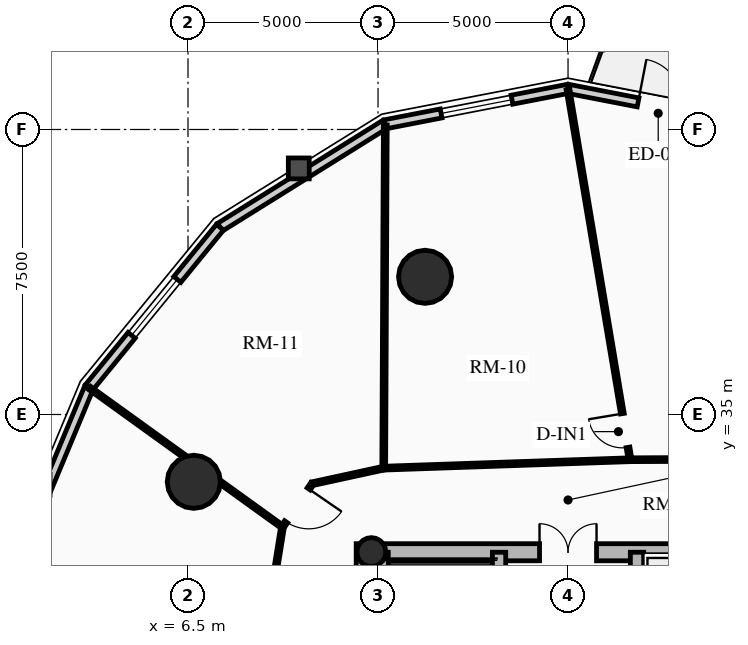
"""IFC4 building model, lengths in metres.
Left out: names, types, materials, properties, quantities, classifications, styles, units other than length and angle.
Written with IfcOpenShell. Run it as: python <this file> out.ifc"""

import sys

from ifc_helpers import new_model, si_unit, direction, frame, frame_2d, origin, origin_2d, place, context, subcontext, project, spatial, rectangle, circle, hollow_circle, extrude, source, transform, mapped, element, fill, save


model = new_model("IFC4")
c1 = context("Model", 3, precision=1e-05, world=origin(), true_north=direction((0.0, 1.0)))
c2 = subcontext(c1, "Body", "Model", "MODEL_VIEW")
j1 = project(units=[si_unit("LENGTHUNIT", "METRE"), si_unit("PLANEANGLEUNIT", "RADIAN")], contexts=[c1])
p1 = place(None, origin())
s1 = spatial("IfcSite", under=j1, at=p1, CompositionType="ELEMENT")
p2 = place(p1, origin())
s2 = spatial("IfcBuilding", under=s1, at=p2, CompositionType="ELEMENT")
p3 = place(p2, frame((0.0, 0.0, 96.34)))
s3 = spatial("IfcBuildingStorey", under=s2, at=p3, CompositionType="ELEMENT", Elevation=96.34)
p4 = place(p3, frame((11.15, 17.4, 0.0), z_axis=(0.0, 0.0, 1.0), x_axis=(0.0, 1.0, 0.0)))
e1 = element("IfcWall", 1, at=p4, inside=s3, PredefinedType="SHEAR", context=c2, shape_type="SweptSolid", body=[
    extrude(rectangle(XDim=14.2, YDim=0.45, at=frame_2d((7.1, 0.0))), origin(), (0.0, 0.0, 1.0), 2.91),
])
p5 = place(p3, frame((11.15, 31.375, 0.0), z_axis=(0.0, 0.0, 1.0), x_axis=(1.0, 0.0, 0.0)))
e2 = element("IfcWall", 2, at=p5, inside=s3, PredefinedType="SHEAR", context=c2, shape_type="SweptSolid", body=[
    extrude(rectangle(XDim=10.7, YDim=0.45, at=frame_2d((5.35, 0.0))), origin(), (0.0, 0.0, 1.0), 2.91),
])
m1 = source(origin(), c2, "Body", "SweptSolid", [
    extrude(rectangle(XDim=1.5, YDim=2.02, at=frame_2d((0.75, 1.01))), frame((0.0, 0.235, 0.0), z_axis=(0.0, -1.0, 0.0), x_axis=(1.0, 0.0, 0.0)), (0.0, 0.0, 1.0), 0.47),
])
p6 = place(p5, frame((4.6, 0.0, 0.0)))
e3 = element("IfcOpeningElement", 3, at=p6, cuts=e2, PredefinedType="OPENING", context=c2, shape_type="MappedRepresentation", body=[
    mapped(m1, transform((0.0, 0.0, 0.0), x_axis=(1.0, 0.0, 0.0), y_axis=(0.0, 1.0, 0.0), z_axis=(0.0, 0.0, 1.0), scale=1.0)),
])
p7 = place(p3, frame((14.685, 17.625, 0.0), z_axis=(0.0, 0.0, 1.0), x_axis=(0.0, 1.0, 0.0)))
e4 = element("IfcWall", 4, at=p7, inside=s3, PredefinedType="SHEAR", context=c2, shape_type="SweptSolid", body=[
    extrude(rectangle(XDim=13.75, YDim=0.35, at=frame_2d((6.875, 0.0))), origin(), (0.0, 0.0, 1.0), 2.91),
])
m2 = source(origin(), c2, "Body", "SweptSolid", [
    extrude(rectangle(XDim=1.1, YDim=2.015, at=frame_2d((0.55, 1.007))), frame((0.0, 0.185, 0.0), z_axis=(0.0, -1.0, 0.0), x_axis=(1.0, 0.0, 0.0)), (0.0, 0.0, 1.0), 0.37),
])
p8 = place(p7, frame((4.875, 0.0, 0.0)))
e5 = element("IfcOpeningElement", 5, at=p8, cuts=e4, PredefinedType="OPENING", context=c2, shape_type="MappedRepresentation", body=[
    mapped(m2, transform((0.0, 0.0, 0.0), x_axis=(1.0, 0.0, 0.0), y_axis=(0.0, 1.0, 0.0), z_axis=(0.0, 0.0, 1.0), scale=1.0)),
])
m3 = source(origin(), c2, "Body", "SweptSolid", [
    extrude(rectangle(XDim=1.15, YDim=2.02, at=frame_2d((0.575, 1.01))), frame((0.0, 0.185, 0.0), z_axis=(0.0, -1.0, 0.0), x_axis=(1.0, 0.0, 0.0)), (0.0, 0.0, 1.0), 0.37),
])
p9 = place(p7, frame((7.295, 0.0, 0.0)))
e6 = element("IfcOpeningElement", 6, at=p9, cuts=e4, PredefinedType="OPENING", context=c2, shape_type="MappedRepresentation", body=[
    mapped(m3, transform((0.0, 0.0, 0.0), x_axis=(1.0, 0.0, 0.0), y_axis=(0.0, 1.0, 0.0), z_axis=(0.0, 0.0, 1.0), scale=1.0)),
])
p10 = place(p3, frame((18.315, 17.625, 0.0), z_axis=(0.0, 0.0, 1.0), x_axis=(0.0, 1.0, 0.0)))
e7 = element("IfcWall", 7, at=p10, inside=s3, PredefinedType="SHEAR", context=c2, shape_type="SweptSolid", body=[
    extrude(rectangle(XDim=13.75, YDim=0.35, at=frame_2d((6.875, 0.0))), origin(), (0.0, 0.0, 1.0), 2.91),
])
p11 = place(p10, frame((10.0, 0.0, 0.0)))
e8 = element("IfcOpeningElement", 8, at=p11, cuts=e7, PredefinedType="OPENING", context=c2, shape_type="MappedRepresentation", body=[
    mapped(m2, transform((0.0, 0.0, 0.0), x_axis=(1.0, 0.0, 0.0), y_axis=(0.0, 1.0, 0.0), z_axis=(0.0, 0.0, 1.0), scale=1.0)),
])
p12 = place(p10, frame((12.0, 0.0, 0.0)))
e9 = element("IfcOpeningElement", 9, at=p12, cuts=e7, PredefinedType="OPENING", context=c2, shape_type="MappedRepresentation", body=[
    mapped(m2, transform((0.0, 0.0, 0.0), x_axis=(1.0, 0.0, 0.0), y_axis=(0.0, 1.0, 0.0), z_axis=(0.0, 0.0, 1.0), scale=1.0)),
])
p13 = place(p10, frame((5.305, 0.0, 0.0)))
e10 = element("IfcOpeningElement", 10, at=p13, cuts=e7, PredefinedType="OPENING", context=c2, shape_type="MappedRepresentation", body=[
    mapped(m3, transform((0.0, 0.0, 0.0), x_axis=(1.0, 0.0, 0.0), y_axis=(0.0, 1.0, 0.0), z_axis=(0.0, 0.0, 1.0), scale=1.0)),
])
p14 = place(p3, frame((11.595, 24.655, 0.0), z_axis=(0.0, 0.0, 1.0), x_axis=(0.0, 1.0, 0.0)))
e11 = element("IfcWall", 11, at=p14, inside=s3, PredefinedType="SHEAR", context=c2, shape_type="SweptSolid", body=[
    extrude(rectangle(XDim=6.72, YDim=0.35, at=frame_2d((3.36, 0.0))), origin(), (0.0, 0.0, 1.0), 2.91),
])
p15 = place(p3, frame((11.325, 31.38, 0.0), z_axis=(0.0, 0.0, 1.0), x_axis=(1.0, 0.0, 0.0)))
e12 = element("IfcColumn", 12, at=p15, inside=s3, PredefinedType="COLUMN", context=c2, shape_type="SweptSolid", body=[
    extrude(hollow_circle(Radius=0.38, WallThickness=0.032, at=origin_2d()), origin(), (0.0, 0.0, 1.0), 2.91),
])
for number, where, z_axis, x_axis in (
    (13, (12.739, 38.623, 0.0), (0.0, 0.0, 1.0), (1.0, 0.0, 0.0)),
    (14, (6.653, 33.229, 0.0), (0.0, 0.0, 1.0), (1.0, 0.0, 0.0)),
):
    element("IfcColumn", number, at=place(p3, frame(where, z_axis=z_axis, x_axis=x_axis)), inside=s3, PredefinedType="USERDEFINED", context=c2, shape_type="SweptSolid", body=[
        extrude(circle(Radius=0.7, at=origin_2d()), origin(), (0.0, 0.0, 1.0), 2.91),
    ])
p16 = place(p3, frame((16.5, 43.57, 0.0), z_axis=(0.0, 0.0, 1.0), x_axis=(0.981723785992, -0.190311344954, 0.0)))
e15 = element("IfcWall", 15, at=p16, inside=s3, PredefinedType="SOLIDWALL", context=c2, shape_type="SweptSolid", body=[
    extrude(rectangle(XDim=4.904, YDim=0.24, at=frame_2d((2.452, 0.0))), origin(), (0.0, 0.0, 1.0), 2.179),
])
m4 = source(origin(), c2, "Body", "SweptSolid", [
    extrude(rectangle(XDim=1.15, YDim=2.005, at=frame_2d((0.575, 1.002))), frame((0.0, 0.13, 0.0), z_axis=(0.0, -1.0, 0.0), x_axis=(1.0, 0.0, 0.0)), (0.0, 0.0, 1.0), 0.26),
])
p17 = place(p16, frame((1.877, 0.0, 0.0)))
e16 = element("IfcOpeningElement", 16, at=p17, cuts=e15, PredefinedType="OPENING", context=c2, shape_type="MappedRepresentation", body=[
    mapped(m4, transform((0.0, 0.0, 0.0), x_axis=(1.0, 0.0, 0.0), y_axis=(0.0, 1.0, 0.0), z_axis=(0.0, 0.0, 1.0), scale=1.0)),
])
p18 = place(p3, frame((11.685, 42.637, 0.0), z_axis=(0.0, 0.0, 1.0), x_axis=(0.981723785992, 0.190311344954, 0.0)))
e17 = element("IfcWall", 17, at=p18, inside=s3, PredefinedType="SOLIDWALL", context=c2, shape_type="SweptSolid", body=[
    extrude(rectangle(XDim=4.904, YDim=0.24, at=frame_2d((2.452, 0.0))), origin(), (0.0, 0.0, 1.0), 2.179),
])
m5 = source(origin(), c2, "Body", "SweptSolid", [
    extrude(rectangle(XDim=1.9, YDim=1.35, at=frame_2d((0.95, 0.675))), frame((0.0, 0.13, 0.0), z_axis=(0.0, -1.0, 0.0), x_axis=(1.0, 0.0, 0.0)), (0.0, 0.0, 1.0), 0.26),
])
p19 = place(p18, frame((1.502, 0.0, 0.65)))
e18 = element("IfcOpeningElement", 18, at=p19, cuts=e17, PredefinedType="OPENING", context=c2, shape_type="MappedRepresentation", body=[
    mapped(m5, transform((0.0, 0.0, 0.0), x_axis=(1.0, 0.0, 0.0), y_axis=(0.0, 1.0, 0.0), z_axis=(0.0, 0.0, 1.0), scale=1.0)),
])
p20 = place(p3, frame((7.342, 39.928, 0.0), z_axis=(0.0, 0.0, 1.0), x_axis=(0.848520380187, 0.529162701263, 0.0)))
e19 = element("IfcWall", 19, at=p20, inside=s3, PredefinedType="SOLIDWALL", context=c2, shape_type="SweptSolid", body=[
    extrude(rectangle(XDim=5.119, YDim=0.24, at=frame_2d((2.56, 0.0))), origin(), (0.0, 0.0, 1.0), 2.179),
])
p21 = place(p3, frame((3.895, 35.709, 0.0), z_axis=(0.0, 0.0, 1.0), x_axis=(0.632700781152, 0.77439635945, 0.0)))
e20 = element("IfcWall", 20, at=p21, inside=s3, PredefinedType="SOLIDWALL", context=c2, shape_type="SweptSolid", body=[
    extrude(rectangle(XDim=5.448, YDim=0.24, at=frame_2d((2.724, 0.0))), origin(), (0.0, 0.0, 1.0), 2.179),
])
p22 = place(p21, frame((1.774, 0.0, 0.65)))
e21 = element("IfcOpeningElement", 21, at=p22, cuts=e20, PredefinedType="OPENING", context=c2, shape_type="MappedRepresentation", body=[
    mapped(m5, transform((0.0, 0.0, 0.0), x_axis=(1.0, 0.0, 0.0), y_axis=(0.0, 1.0, 0.0), z_axis=(0.0, 0.0, 1.0), scale=1.0)),
])
p23 = place(p3, frame((1.682, 30.393, 0.0), z_axis=(0.0, 0.0, 1.0), x_axis=(0.384344417632, 0.923189779317, 0.0)))
e22 = element("IfcWall", 22, at=p23, inside=s3, PredefinedType="SOLIDWALL", context=c2, shape_type="SweptSolid", body=[
    extrude(rectangle(XDim=5.758, YDim=0.24, at=frame_2d((2.879, 0.0))), origin(), (0.0, 0.0, 1.0), 2.179),
])
p24 = place(p3, frame((21.496, 33.824, 0.0), z_axis=(0.0, 0.0, 1.0), x_axis=(-0.999990516754, -0.004355043261, 0.0)))
e23 = element("IfcWall", 23, at=p24, inside=s3, PredefinedType="MOVABLE", context=c2, shape_type="SweptSolid", body=[
    extrude(rectangle(XDim=3.364, YDim=0.1, at=frame_2d((1.682, 0.0))), origin(), (0.0, 0.0, 1.0), 2.225),
])
p25 = place(p3, frame((18.133, 33.81, 0.0), z_axis=(0.0, 0.0, 1.0), x_axis=(-0.999415793323, -0.03417706916, 0.0)))
e24 = element("IfcWall", 24, at=p25, inside=s3, PredefinedType="MOVABLE", context=c2, shape_type="SweptSolid", body=[
    extrude(rectangle(XDim=6.486, YDim=0.1, at=frame_2d((3.243, 0.0))), origin(), (0.0, 0.0, 1.0), 2.225),
])
p26 = place(p3, frame((11.65, 33.588, 0.0), z_axis=(0.0, 0.0, 1.0), x_axis=(-0.977141987047, -0.212587716366, 0.0)))
e25 = element("IfcWall", 25, at=p26, inside=s3, PredefinedType="MOVABLE", context=c2, shape_type="SweptSolid", body=[
    extrude(rectangle(XDim=1.924, YDim=0.1, at=frame_2d((0.962, 0.0))), origin(), (0.0, 0.0, 1.0), 2.225),
])
p27 = place(p3, frame((9.771, 33.179, 0.0), z_axis=(0.0, 0.0, 1.0), x_axis=(-0.56664857412, -0.823959582412, 0.0)))
e26 = element("IfcWall", 26, at=p27, inside=s3, PredefinedType="MOVABLE", context=c2, shape_type="SweptSolid", body=[
    extrude(rectangle(XDim=1.384, YDim=0.1, at=frame_2d((0.692, 0.0))), origin(), (0.0, 0.0, 1.0), 2.225),
])
m6 = source(origin(), c2, "Body", "SweptSolid", [
    extrude(rectangle(XDim=1.05, YDim=2.015, at=frame_2d((0.525, 1.007))), frame((0.0, 0.06, 0.0), z_axis=(0.0, -1.0, 0.0), x_axis=(1.0, 0.0, 0.0)), (0.0, 0.0, 1.0), 0.12),
])
p28 = place(p27, frame((0.167, 0.0, 0.0)))
e27 = element("IfcOpeningElement", 27, at=p28, cuts=e26, PredefinedType="OPENING", context=c2, shape_type="MappedRepresentation", body=[
    mapped(m6, transform((0.0, 0.0, 0.0), x_axis=(1.0, 0.0, 0.0), y_axis=(0.0, 1.0, 0.0), z_axis=(0.0, 0.0, 1.0), scale=1.0)),
])
p29 = place(p3, frame((8.986, 32.038, 0.0), z_axis=(0.0, 0.0, 1.0), x_axis=(-0.158224526738, -0.987403159372, 0.0)))
e28 = element("IfcWall", 28, at=p29, inside=s3, PredefinedType="MOVABLE", context=c2, shape_type="SweptSolid", body=[
    extrude(rectangle(XDim=1.546, YDim=0.1, at=frame_2d((0.773, 0.0))), origin(), (0.0, 0.0, 1.0), 2.225),
])
p30 = place(p3, frame((11.65, 33.588, 0.0), z_axis=(0.0, 0.0, 1.0), x_axis=(0.004542212376, 0.9999896841, 0.0)))
e29 = element("IfcWall", 29, at=p30, inside=s3, PredefinedType="MOVABLE", context=c2, shape_type="SweptSolid", body=[
    extrude(rectangle(XDim=9.03, YDim=0.1, at=frame_2d((4.515, 0.0))), origin(), (0.0, 0.0, 1.0), 2.179),
])
p31 = place(p3, frame((8.986, 32.038, 0.0), z_axis=(0.0, 0.0, 1.0), x_axis=(-0.811184127106, 0.584790827502, 0.0)))
e30 = element("IfcWall", 30, at=p31, inside=s3, PredefinedType="MOVABLE", context=c2, shape_type="SweptSolid", body=[
    extrude(rectangle(XDim=6.257, YDim=0.1, at=frame_2d((3.128, 0.0))), origin(), (0.0, 0.0, 1.0), 2.179),
])
p32 = place(p3, frame((18.133, 33.81, 0.0), z_axis=(0.0, 0.0, 1.0), x_axis=(-0.165324898919, 0.98623915852, 0.0)))
e31 = element("IfcWall", 31, at=p32, inside=s3, PredefinedType="MOVABLE", context=c2, shape_type="SweptSolid", body=[
    extrude(rectangle(XDim=9.876, YDim=0.1, at=frame_2d((4.938, 0.0))), origin(), (0.0, 0.0, 1.0), 2.179),
])
m7 = source(origin(), c2, "Body", "SweptSolid", [
    extrude(rectangle(XDim=0.9, YDim=2.005, at=frame_2d((0.45, 1.002))), frame((0.0, 0.06, 0.0), z_axis=(0.0, -1.0, 0.0), x_axis=(1.0, 0.0, 0.0)), (0.0, 0.0, 1.0), 0.12),
])
p33 = place(p32, frame((0.33, 0.0, 0.0)))
e32 = element("IfcOpeningElement", 32, at=p33, cuts=e31, PredefinedType="OPENING", context=c2, shape_type="MappedRepresentation", body=[
    mapped(m7, transform((0.0, 0.0, 0.0), x_axis=(1.0, 0.0, 0.0), y_axis=(0.0, 1.0, 0.0), z_axis=(0.0, 0.0, 1.0), scale=1.0)),
])
m8 = source(origin(), c2, "Body", "SweptSolid", [
    extrude(rectangle(XDim=1.15, YDim=2.005, at=frame_2d((0.575, 1.002))), frame((0.0, 0.025, 0.0), z_axis=(0.0, -1.0, 0.0), x_axis=(1.0, 0.0, 0.0)), (0.0, 0.0, 1.0), 0.05),
])
p34 = place(p17, origin())
e33 = element("IfcDoor", 33, at=p34, inside=s3, OperationType="SINGLE_SWING_LEFT", PredefinedType="DOOR", context=c2, shape_type="MappedRepresentation", body=[
    mapped(m8, transform((0.0, 0.0, 0.0), x_axis=(1.0, 0.0, 0.0), y_axis=(0.0, 1.0, 0.0), z_axis=(0.0, 0.0, 1.0), scale=1.0)),
])
fill(e16, e33)
m9 = source(origin(), c2, "Body", "SweptSolid", [
    extrude(rectangle(XDim=1.9, YDim=1.35, at=frame_2d((0.95, 0.675))), frame((0.0, 0.03, 0.0), z_axis=(0.0, -1.0, 0.0), x_axis=(1.0, 0.0, 0.0)), (0.0, 0.0, 1.0), 0.06),
])
p35 = place(p19, origin())
e34 = element("IfcWindow", 34, at=p35, inside=s3, PartitioningType="DOUBLE_PANEL_VERTICAL", PredefinedType="WINDOW", context=c2, shape_type="MappedRepresentation", body=[
    mapped(m9, transform((0.0, 0.0, 0.0), x_axis=(1.0, 0.0, 0.0), y_axis=(0.0, 1.0, 0.0), z_axis=(0.0, 0.0, 1.0), scale=1.0)),
])
fill(e18, e34)
p36 = place(p22, origin())
e35 = element("IfcWindow", 35, at=p36, inside=s3, PartitioningType="DOUBLE_PANEL_VERTICAL", PredefinedType="WINDOW", context=c2, shape_type="MappedRepresentation", body=[
    mapped(m9, transform((0.0, 0.0, 0.0), x_axis=(1.0, 0.0, 0.0), y_axis=(0.0, 1.0, 0.0), z_axis=(0.0, 0.0, 1.0), scale=1.0)),
])
fill(e21, e35)
m10 = source(origin(), c2, "Body", "SweptSolid", [
    extrude(rectangle(XDim=1.5, YDim=2.02, at=frame_2d((0.75, 1.01))), frame((0.0, 0.025, 0.0), z_axis=(0.0, -1.0, 0.0), x_axis=(1.0, 0.0, 0.0)), (0.0, 0.0, 1.0), 0.05),
])
p37 = place(p6, origin())
e36 = element("IfcDoor", 36, at=p37, inside=s3, OperationType="DOUBLE_DOOR_SINGLE_SWING", PredefinedType="DOOR", context=c2, shape_type="MappedRepresentation", body=[
    mapped(m10, transform((0.0, 0.0, 0.0), x_axis=(1.0, 0.0, 0.0), y_axis=(0.0, 1.0, 0.0), z_axis=(0.0, 0.0, 1.0), scale=1.0)),
])
fill(e3, e36)
m11 = source(origin(), c2, "Body", "SweptSolid", [
    extrude(rectangle(XDim=0.9, YDim=2.005, at=frame_2d((0.45, 1.002))), frame((0.0, 0.025, 0.0), z_axis=(0.0, -1.0, 0.0), x_axis=(1.0, 0.0, 0.0)), (0.0, 0.0, 1.0), 0.05),
])
p38 = place(p33, origin())
e37 = element("IfcDoor", 37, at=p38, inside=s3, OperationType="SINGLE_SWING_RIGHT", PredefinedType="DOOR", context=c2, shape_type="MappedRepresentation", body=[
    mapped(m11, transform((0.0, 0.0, 0.0), x_axis=(1.0, 0.0, 0.0), y_axis=(0.0, 1.0, 0.0), z_axis=(0.0, 0.0, 1.0), scale=1.0)),
])
fill(e32, e37)
m12 = source(origin(), c2, "Body", "SweptSolid", [
    extrude(rectangle(XDim=1.05, YDim=2.015, at=frame_2d((0.525, 1.007))), frame((0.0, 0.025, 0.0), z_axis=(0.0, -1.0, 0.0), x_axis=(1.0, 0.0, 0.0)), (0.0, 0.0, 1.0), 0.05),
])
p39 = place(p28, origin())
e38 = element("IfcDoor", 38, at=p39, inside=s3, OperationType="SINGLE_SWING_LEFT", PredefinedType="DOOR", context=c2, shape_type="MappedRepresentation", body=[
    mapped(m12, transform((0.0, 0.0, 0.0), x_axis=(1.0, 0.0, 0.0), y_axis=(0.0, 1.0, 0.0), z_axis=(0.0, 0.0, 1.0), scale=1.0)),
])
fill(e27, e38)
save(model, sys.argv[1])
